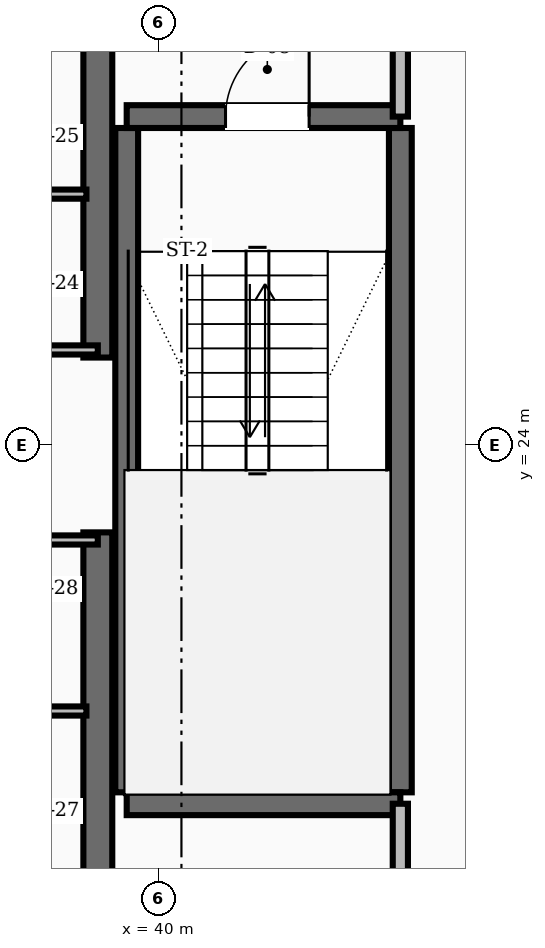
"""IFC4 building model, lengths in metres.
Left out: names, types, materials, properties, quantities, classifications, styles, units other than length and angle.
Written with IfcOpenShell. Run it as: python <this file> out.ifc"""

import sys

from ifc_helpers import new_model, si_unit, direction, frame, frame_2d, origin, place, context, subcontext, project, spatial, rectangle, extrude, element, fill, save


model = new_model("IFC4")
c1 = context("Model", 3, precision=1e-05, world=origin(), true_north=direction((0.0, 1.0)))
c2 = subcontext(c1, "Body", "Model", "MODEL_VIEW")
j1 = project(units=[si_unit("LENGTHUNIT", "METRE"), si_unit("PLANEANGLEUNIT", "RADIAN")], contexts=[c1])
p1 = place(None, origin())
s1 = spatial("IfcSite", under=j1, at=p1, CompositionType="ELEMENT")
p2 = place(p1, origin())
s2 = spatial("IfcBuilding", under=s1, at=p2, CompositionType="ELEMENT")
p3 = place(p2, frame((0.0, 0.0, 80.8)))
s3 = spatial("IfcBuildingStorey", under=s2, at=p3, CompositionType="ELEMENT", Elevation=80.8)
for number, where, z_axis, x_axis in (
    (1, (39.2, 16.55, 0.0), (0.0, 0.0, 1.0), (0.0, 1.0, 0.0)),
    (2, (39.2, 25.15, 0.0), (0.0, 0.0, 1.0), (0.0, 1.0, 0.0)),
):
    element("IfcWall", number, at=place(p3, frame(where, z_axis=z_axis, x_axis=x_axis)), inside=s3, PredefinedType="SHEAR", context=c2, shape_type="SweptSolid", body=[
        extrude(rectangle(XDim=6.3, YDim=0.38, at=frame_2d((3.15, 0.0))), origin(), (0.0, 0.0, 1.0), 3.6),
    ])
for number, where, z_axis, x_axis in (
    (3, (43.18, 19.43, 0.0), (0.0, 0.0, 1.0), (0.0, 1.0, 0.0)),
    (4, (39.58, 19.43, 0.0), (0.0, 0.0, 1.0), (0.0, 1.0, 0.0)),
):
    element("IfcWall", number, at=place(p3, frame(where, z_axis=z_axis, x_axis=x_axis)), inside=s3, PredefinedType="SHEAR", context=c2, shape_type="SweptSolid", body=[
        extrude(rectangle(XDim=8.74, YDim=0.3, at=frame_2d((4.37, 0.0))), origin(), (0.0, 0.0, 1.0), 3.6),
    ])
p4 = place(p3, frame((39.58, 19.28, 0.0), z_axis=(0.0, 0.0, 1.0), x_axis=(1.0, 0.0, 0.0)))
e5 = element("IfcWall", 5, at=p4, inside=s3, PredefinedType="SHEAR", context=c2, shape_type="SweptSolid", body=[
    extrude(rectangle(XDim=3.6, YDim=0.3, at=frame_2d((1.8, 0.0))), origin(), (0.0, 0.0, 1.0), 3.6),
])
p5 = place(p3, frame((39.58, 28.32, 0.0), z_axis=(0.0, 0.0, 1.0), x_axis=(1.0, 0.0, 0.0)))
e6 = element("IfcWall", 6, at=p5, inside=s3, PredefinedType="SHEAR", context=c2, shape_type="SweptSolid", body=[
    extrude(rectangle(XDim=3.6, YDim=0.3, at=frame_2d((1.8, 0.0))), origin(), (0.0, 0.0, 1.0), 3.6),
])
p6 = place(p5, frame((1.3, 0.0, 0.0)))
e7 = element("IfcOpeningElement", 7, at=p6, cuts=e6, PredefinedType="OPENING", context=c2, shape_type="SweptSolid", body=[
    extrude(rectangle(XDim=1.1, YDim=2.1, at=frame_2d((0.55, 1.05))), frame((0.0, 0.16, 0.0), z_axis=(0.0, -1.0, 0.0), x_axis=(1.0, 0.0, 0.0)), (0.0, 0.0, 1.0), 0.32),
])
p7 = place(p3, frame((43.18, 28.32, 0.0), z_axis=(0.0, 0.0, 1.0), x_axis=(0.0, 1.0, 0.0)))
e8 = element("IfcWall", 8, at=p7, inside=s3, PredefinedType="SOLIDWALL", context=c2, shape_type="SweptSolid", body=[
    extrude(rectangle(XDim=3.13, YDim=0.2, at=frame_2d((1.565, 0.0))), origin(), (0.0, 0.0, 1.0), 2.71),
])
p8 = place(p7, frame((1.015, 0.0, 0.0)))
e9 = element("IfcOpeningElement", 9, at=p8, cuts=e8, PredefinedType="OPENING", context=c2, shape_type="SweptSolid", body=[
    extrude(rectangle(XDim=1.1, YDim=2.1, at=frame_2d((0.55, 1.05))), frame((0.0, 0.11, 0.0), z_axis=(0.0, -1.0, 0.0), x_axis=(1.0, 0.0, 0.0)), (0.0, 0.0, 1.0), 0.22),
])
p9 = place(p3, frame((43.18, 16.55, 0.0), z_axis=(0.0, 0.0, 1.0), x_axis=(0.0, 1.0, 0.0)))
e10 = element("IfcWall", 10, at=p9, inside=s3, PredefinedType="SOLIDWALL", context=c2, shape_type="SweptSolid", body=[
    extrude(rectangle(XDim=2.73, YDim=0.2, at=frame_2d((1.365, 0.0))), origin(), (0.0, 0.0, 1.0), 2.71),
])
p10 = place(p9, frame((0.89, 0.0, 0.0)))
e11 = element("IfcOpeningElement", 11, at=p10, cuts=e10, PredefinedType="OPENING", context=c2, shape_type="SweptSolid", body=[
    extrude(rectangle(XDim=0.95, YDim=2.1, at=frame_2d((0.475, 1.05))), frame((0.0, 0.11, 0.0), z_axis=(0.0, -1.0, 0.0), x_axis=(1.0, 0.0, 0.0)), (0.0, 0.0, 1.0), 0.22),
])
for number, where, z_axis, x_axis in (
    (12, (37.4, 25.25, 0.0), (0.0, 0.0, 1.0), (1.0, 0.0, 0.0)),
    (13, (37.4, 22.75, 0.0), (0.0, 0.0, 1.0), (1.0, 0.0, 0.0)),
):
    element("IfcWall", number, at=place(p3, frame(where, z_axis=z_axis, x_axis=x_axis)), inside=s3, PredefinedType="PARTITIONING", context=c2, shape_type="SweptSolid", body=[
        extrude(rectangle(XDim=1.8, YDim=0.12, at=frame_2d((0.9, 0.0))), origin(), (0.0, 0.0, 1.0), 2.71),
    ])
for number, where, z_axis, x_axis in (
    (14, (37.4, 27.3, 0.0), (0.0, 0.0, 1.0), (1.0, 0.0, 0.0)),
    (15, (37.4, 20.5, 0.0), (0.0, 0.0, 1.0), (1.0, 0.0, 0.0)),
):
    element("IfcWall", number, at=place(p3, frame(where, z_axis=z_axis, x_axis=x_axis)), inside=s3, PredefinedType="PARTITIONING", context=c2, shape_type="SweptSolid", body=[
        extrude(rectangle(XDim=1.65, YDim=0.12, at=frame_2d((0.825, 0.0))), origin(), (0.0, 0.0, 1.0), 2.71),
    ])
p11 = place(p6, origin())
e16 = element("IfcDoor", 16, at=p11, inside=s3, OperationType="SINGLE_SWING_RIGHT", PredefinedType="DOOR", context=c2, shape_type="SweptSolid", body=[
    extrude(rectangle(XDim=1.1, YDim=2.1, at=frame_2d((0.55, 1.05))), frame((0.0, 0.025, 0.0), z_axis=(0.0, -1.0, 0.0), x_axis=(1.0, 0.0, 0.0)), (0.0, 0.0, 1.0), 0.05),
])
fill(e7, e16)
save(model, sys.argv[1])
